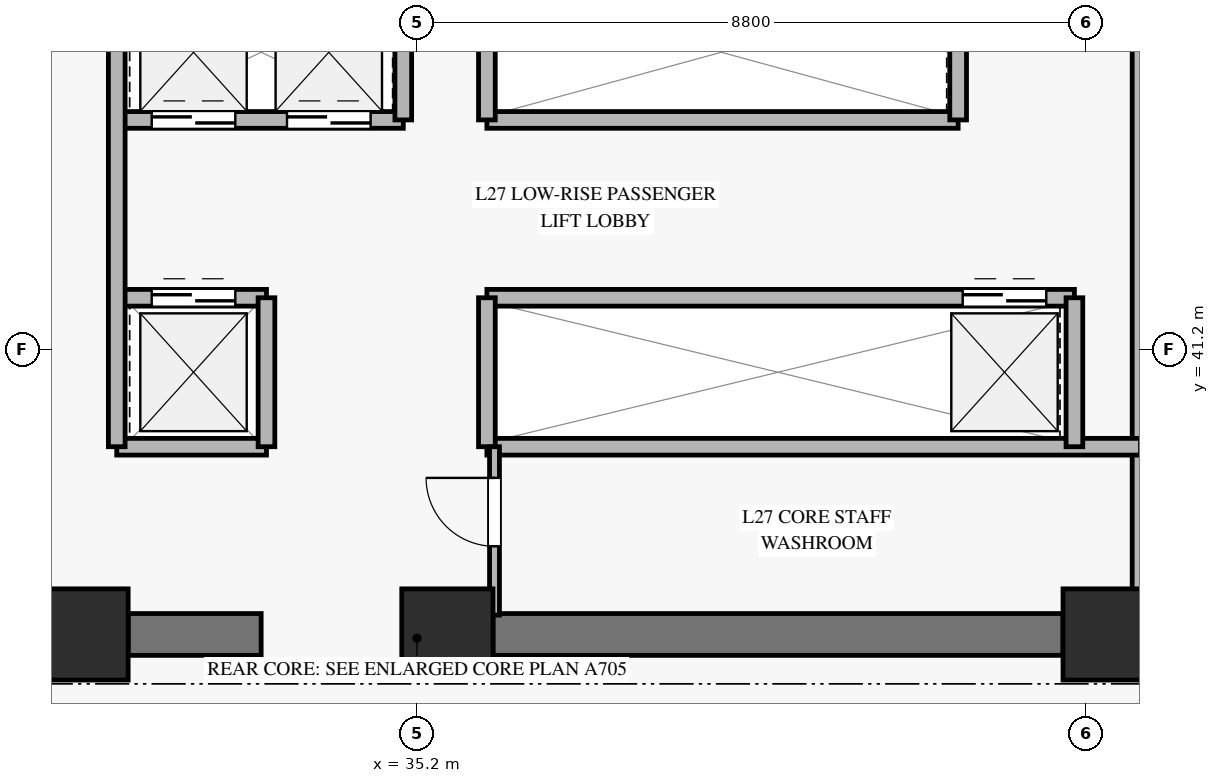
"""IFC4 building model, lengths in metres.
Left out: names, types, materials, properties, quantities, classifications, styles, units other than length and angle.
Written with IfcOpenShell. Run it as: python <this file> out.ifc"""

import sys

from ifc_helpers import new_model, si_unit, direction, frame, frame_2d, origin, origin_2d, place, context, subcontext, project, spatial, rectangle, extrude, source, transform, mapped, element, fill, save


model = new_model("IFC4")
c1 = context("Model", 3, precision=1e-05, world=origin(), true_north=direction((0.0, 1.0)))
c2 = subcontext(c1, "Body", "Model", "MODEL_VIEW")
j1 = project(units=[si_unit("LENGTHUNIT", "METRE"), si_unit("PLANEANGLEUNIT", "RADIAN")], contexts=[c1])
p1 = place(None, origin())
s1 = spatial("IfcSite", under=j1, at=p1, CompositionType="ELEMENT")
p2 = place(p1, origin())
s2 = spatial("IfcBuilding", under=s1, at=p2, CompositionType="ELEMENT")
p3 = place(p2, frame((0.0, 0.0, 111.4)))
s3 = spatial("IfcBuildingStorey", under=s2, at=p3, CompositionType="ELEMENT", Elevation=111.4)
m1 = source(origin(), c2, "Body", "SweptSolid", [
    extrude(rectangle(XDim=1.2, YDim=1.2, at=origin_2d()), origin(), (0.0, 0.0, 1.0), 3.68),
])
for number, where, z_axis, x_axis in (
    (1, (30.8, 37.45, 0.0), (0.0, 0.0, 1.0), (1.0, 0.0, 0.0)),
    (2, (35.6, 37.45, 0.0), (0.0, 0.0, 1.0), (1.0, 0.0, 0.0)),
    (3, (44.3, 37.45, 0.0), (0.0, 0.0, 1.0), (1.0, 0.0, 0.0)),
):
    element("IfcColumn", number, at=place(p3, frame(where, z_axis=z_axis, x_axis=x_axis)), inside=s3, PredefinedType="PILASTER", context=c2, shape_type="MappedRepresentation", body=[
        mapped(m1, transform((0.0, 0.0, 0.0), x_axis=(1.0, 0.0, 0.0), y_axis=(0.0, 1.0, 0.0), z_axis=(0.0, 0.0, 1.0), scale=1.0)),
    ])
p4 = place(p3, frame((31.4, 37.45, 0.0), z_axis=(0.0, 0.0, 1.0), x_axis=(1.0, 0.0, 0.0)))
e4 = element("IfcWall", 4, at=p4, inside=s3, PredefinedType="SHEAR", context=c2, shape_type="SweptSolid", body=[
    extrude(rectangle(XDim=1.75, YDim=0.55, at=frame_2d((0.875, 0.0))), origin(), (0.0, 0.0, 1.0), 3.68),
])
p5 = place(p3, frame((36.2, 37.45, 0.0), z_axis=(0.0, 0.0, 1.0), x_axis=(1.0, 0.0, 0.0)))
e5 = element("IfcWall", 5, at=p5, inside=s3, PredefinedType="SHEAR", context=c2, shape_type="SweptSolid", body=[
    extrude(rectangle(XDim=7.5, YDim=0.55, at=frame_2d((3.75, 0.0))), origin(), (0.0, 0.0, 1.0), 3.68),
])
p6 = place(p3, frame((44.72, 37.705, 0.0), z_axis=(0.0, 0.0, 1.0), x_axis=(0.0, 1.0, 0.0)))
e6 = element("IfcWall", 6, at=p6, inside=s3, PredefinedType="SOLIDWALL", context=c2, shape_type="SweptSolid", body=[
    extrude(rectangle(XDim=7.515, YDim=0.22, at=frame_2d((3.757, 0.0))), origin(), (0.0, 0.0, 1.0), 3.68),
])
p7 = place(p3, frame((31.25, 44.22, 0.0), z_axis=(0.0, 0.0, 1.0), x_axis=(1.0, 0.0, 0.0)))
e7 = element("IfcWall", 7, at=p7, inside=s3, PredefinedType="SOLIDWALL", context=c2, shape_type="SweptSolid", body=[
    extrude(rectangle(XDim=3.77, YDim=0.22, at=frame_2d((1.885, 0.0))), origin(), (0.0, 0.0, 1.0), 3.68),
])
p8 = place(p7, frame((0.46, 0.0, 0.0)))
e8 = element("IfcOpeningElement", 8, at=p8, cuts=e7, PredefinedType="OPENING", context=c2, shape_type="SweptSolid", body=[
    extrude(rectangle(XDim=1.1, YDim=2.2, at=frame_2d((0.55, 1.1))), frame((0.0, 0.12, 0.0), z_axis=(0.0, -1.0, 0.0), x_axis=(1.0, 0.0, 0.0)), (0.0, 0.0, 1.0), 0.24),
])
p9 = place(p7, frame((2.24, 0.0, 0.0)))
e9 = element("IfcOpeningElement", 9, at=p9, cuts=e7, PredefinedType="OPENING", context=c2, shape_type="SweptSolid", body=[
    extrude(rectangle(XDim=1.1, YDim=2.2, at=frame_2d((0.55, 1.1))), frame((0.0, 0.12, 0.0), z_axis=(0.0, -1.0, 0.0), x_axis=(1.0, 0.0, 0.0)), (0.0, 0.0, 1.0), 0.24),
])
p10 = place(p3, frame((36.12, 44.22, 0.0), z_axis=(0.0, 0.0, 1.0), x_axis=(1.0, 0.0, 0.0)))
e10 = element("IfcWall", 10, at=p10, inside=s3, PredefinedType="SOLIDWALL", context=c2, shape_type="SweptSolid", body=[
    extrude(rectangle(XDim=6.2, YDim=0.22, at=frame_2d((3.1, 0.0))), origin(), (0.0, 0.0, 1.0), 3.68),
])
for number, where, z_axis, x_axis in (
    (11, (35.02, 44.22, 0.0), (0.0, 0.0, 1.0), (0.0, 1.0, 0.0)),
    (12, (36.12, 44.22, 0.0), (0.0, 0.0, 1.0), (0.0, 1.0, 0.0)),
    (13, (42.32, 44.22, 0.0), (0.0, 0.0, 1.0), (0.0, 1.0, 0.0)),
):
    element("IfcWall", number, at=place(p3, frame(where, z_axis=z_axis, x_axis=x_axis)), inside=s3, PredefinedType="SOLIDWALL", context=c2, shape_type="SweptSolid", body=[
        extrude(rectangle(XDim=2.075, YDim=0.22, at=frame_2d((1.038, 0.0))), origin(), (0.0, 0.0, 1.0), 3.68),
    ])
p11 = place(p3, frame((31.25, 41.88, 0.0), z_axis=(0.0, 0.0, 1.0), x_axis=(1.0, 0.0, 0.0)))
e14 = element("IfcWall", 14, at=p11, inside=s3, PredefinedType="SOLIDWALL", context=c2, shape_type="SweptSolid", body=[
    extrude(rectangle(XDim=1.97, YDim=0.22, at=frame_2d((0.985, 0.0))), origin(), (0.0, 0.0, 1.0), 3.68),
])
p12 = place(p11, frame((0.46, 0.0, 0.0)))
e15 = element("IfcOpeningElement", 15, at=p12, cuts=e14, PredefinedType="OPENING", context=c2, shape_type="SweptSolid", body=[
    extrude(rectangle(XDim=1.1, YDim=2.2, at=frame_2d((0.55, 1.1))), frame((0.0, 0.12, 0.0), z_axis=(0.0, -1.0, 0.0), x_axis=(1.0, 0.0, 0.0)), (0.0, 0.0, 1.0), 0.24),
])
p13 = place(p3, frame((36.12, 41.88, 0.0), z_axis=(0.0, 0.0, 1.0), x_axis=(1.0, 0.0, 0.0)))
e16 = element("IfcWall", 16, at=p13, inside=s3, PredefinedType="SOLIDWALL", context=c2, shape_type="SweptSolid", body=[
    extrude(rectangle(XDim=7.73, YDim=0.22, at=frame_2d((3.865, 0.0))), origin(), (0.0, 0.0, 1.0), 3.68),
])
p14 = place(p13, frame((6.26, 0.0, 0.0)))
e17 = element("IfcOpeningElement", 17, at=p14, cuts=e16, PredefinedType="OPENING", context=c2, shape_type="SweptSolid", body=[
    extrude(rectangle(XDim=1.1, YDim=2.2, at=frame_2d((0.55, 1.1))), frame((0.0, 0.12, 0.0), z_axis=(0.0, -1.0, 0.0), x_axis=(1.0, 0.0, 0.0)), (0.0, 0.0, 1.0), 0.24),
])
p15 = place(p3, frame((31.25, 39.92, 0.0), z_axis=(0.0, 0.0, 1.0), x_axis=(1.0, 0.0, 0.0)))
e18 = element("IfcWall", 18, at=p15, inside=s3, PredefinedType="SOLIDWALL", context=c2, shape_type="SweptSolid", body=[
    extrude(rectangle(XDim=1.97, YDim=0.22, at=frame_2d((0.985, 0.0))), origin(), (0.0, 0.0, 1.0), 3.68),
])
p16 = place(p3, frame((33.22, 39.92, 0.0), z_axis=(0.0, 0.0, 1.0), x_axis=(0.0, 1.0, 0.0)))
e19 = element("IfcWall", 19, at=p16, inside=s3, PredefinedType="SOLIDWALL", context=c2, shape_type="SweptSolid", body=[
    extrude(rectangle(XDim=1.96, YDim=0.22, at=frame_2d((0.98, 0.0))), origin(), (0.0, 0.0, 1.0), 3.68),
])
p17 = place(p3, frame((36.12, 39.92, 0.0), z_axis=(0.0, 0.0, 1.0), x_axis=(1.0, 0.0, 0.0)))
e20 = element("IfcWall", 20, at=p17, inside=s3, PredefinedType="SOLIDWALL", context=c2, shape_type="SweptSolid", body=[
    extrude(rectangle(XDim=8.6, YDim=0.22, at=frame_2d((4.3, 0.0))), origin(), (0.0, 0.0, 1.0), 2.965),
])
p18 = place(p3, frame((36.12, 39.92, 0.0), z_axis=(0.0, 0.0, 1.0), x_axis=(0.0, 1.0, 0.0)))
e21 = element("IfcWall", 21, at=p18, inside=s3, PredefinedType="SOLIDWALL", context=c2, shape_type="SweptSolid", body=[
    extrude(rectangle(XDim=1.96, YDim=0.22, at=frame_2d((0.98, 0.0))), origin(), (0.0, 0.0, 1.0), 3.68),
])
p19 = place(p3, frame((31.25, 39.92, 0.0), z_axis=(0.0, 0.0, 1.0), x_axis=(0.0, 1.0, 0.0)))
e22 = element("IfcWall", 22, at=p19, inside=s3, PredefinedType="SOLIDWALL", context=c2, shape_type="SweptSolid", body=[
    extrude(rectangle(XDim=6.375, YDim=0.22, at=frame_2d((3.188, 0.0))), origin(), (0.0, 0.0, 1.0), 3.68),
])
p20 = place(p3, frame((43.85, 39.92, 0.0), z_axis=(0.0, 0.0, 1.0), x_axis=(0.0, 1.0, 0.0)))
e23 = element("IfcWall", 23, at=p20, inside=s3, PredefinedType="SOLIDWALL", context=c2, shape_type="SweptSolid", body=[
    extrude(rectangle(XDim=1.96, YDim=0.22, at=frame_2d((0.98, 0.0))), origin(), (0.0, 0.0, 1.0), 3.68),
])
p21 = place(p3, frame((36.22, 37.705, 0.0), z_axis=(0.0, 0.0, 1.0), x_axis=(0.0, 1.0, 0.0)))
e24 = element("IfcWall", 24, at=p21, inside=s3, PredefinedType="PARTITIONING", context=c2, shape_type="SweptSolid", body=[
    extrude(rectangle(XDim=2.215, YDim=0.13, at=frame_2d((1.107, 0.0))), origin(), (0.0, 0.0, 1.0), 3.68),
])
p22 = place(p21, frame((0.905, 0.0, 0.0)))
e25 = element("IfcOpeningElement", 25, at=p22, cuts=e24, PredefinedType="OPENING", context=c2, shape_type="SweptSolid", body=[
    extrude(rectangle(XDim=0.9, YDim=2.1, at=frame_2d((0.45, 1.05))), frame((0.0, 0.075, 0.0), z_axis=(0.0, -1.0, 0.0), x_axis=(1.0, 0.0, 0.0)), (0.0, 0.0, 1.0), 0.15),
])
m2 = source(origin(), c2, "Body", "SweptSolid", [
    extrude(rectangle(XDim=1.1, YDim=2.2, at=frame_2d((0.55, 1.1))), frame((0.0, 0.025, 0.0), z_axis=(0.0, -1.0, 0.0), x_axis=(1.0, 0.0, 0.0)), (0.0, 0.0, 1.0), 0.05),
])
p23 = place(p8, origin())
e26 = element("IfcDoor", 26, at=p23, inside=s3, OperationType="SLIDING_TO_LEFT", PredefinedType="DOOR", context=c2, shape_type="MappedRepresentation", body=[
    mapped(m2, transform((0.0, 0.0, 0.0), x_axis=(1.0, 0.0, 0.0), y_axis=(0.0, 1.0, 0.0), z_axis=(0.0, 0.0, 1.0), scale=1.0)),
])
fill(e8, e26)
p24 = place(p9, origin())
e27 = element("IfcDoor", 27, at=p24, inside=s3, OperationType="SLIDING_TO_LEFT", PredefinedType="DOOR", context=c2, shape_type="MappedRepresentation", body=[
    mapped(m2, transform((0.0, 0.0, 0.0), x_axis=(1.0, 0.0, 0.0), y_axis=(0.0, 1.0, 0.0), z_axis=(0.0, 0.0, 1.0), scale=1.0)),
])
fill(e9, e27)
p25 = place(p12, origin())
e28 = element("IfcDoor", 28, at=p25, inside=s3, OperationType="SLIDING_TO_LEFT", PredefinedType="DOOR", context=c2, shape_type="MappedRepresentation", body=[
    mapped(m2, transform((0.0, 0.0, 0.0), x_axis=(1.0, 0.0, 0.0), y_axis=(0.0, 1.0, 0.0), z_axis=(0.0, 0.0, 1.0), scale=1.0)),
])
fill(e15, e28)
p26 = place(p14, origin())
e29 = element("IfcDoor", 29, at=p26, inside=s3, OperationType="SLIDING_TO_LEFT", PredefinedType="DOOR", context=c2, shape_type="MappedRepresentation", body=[
    mapped(m2, transform((0.0, 0.0, 0.0), x_axis=(1.0, 0.0, 0.0), y_axis=(0.0, 1.0, 0.0), z_axis=(0.0, 0.0, 1.0), scale=1.0)),
])
fill(e17, e29)
m3 = source(origin(), c2, "Body", "SweptSolid", [
    extrude(rectangle(XDim=0.9, YDim=2.1, at=frame_2d((0.45, 1.05))), frame((0.0, 0.025, 0.0), z_axis=(0.0, -1.0, 0.0), x_axis=(1.0, 0.0, 0.0)), (0.0, 0.0, 1.0), 0.05),
])
p27 = place(p22, origin())
e30 = element("IfcDoor", 30, at=p27, inside=s3, OperationType="SINGLE_SWING_RIGHT", PredefinedType="DOOR", context=c2, shape_type="MappedRepresentation", body=[
    mapped(m3, transform((0.0, 0.0, 0.0), x_axis=(1.0, 0.0, 0.0), y_axis=(0.0, 1.0, 0.0), z_axis=(0.0, 0.0, 1.0), scale=1.0)),
])
fill(e25, e30)
save(model, sys.argv[1])
